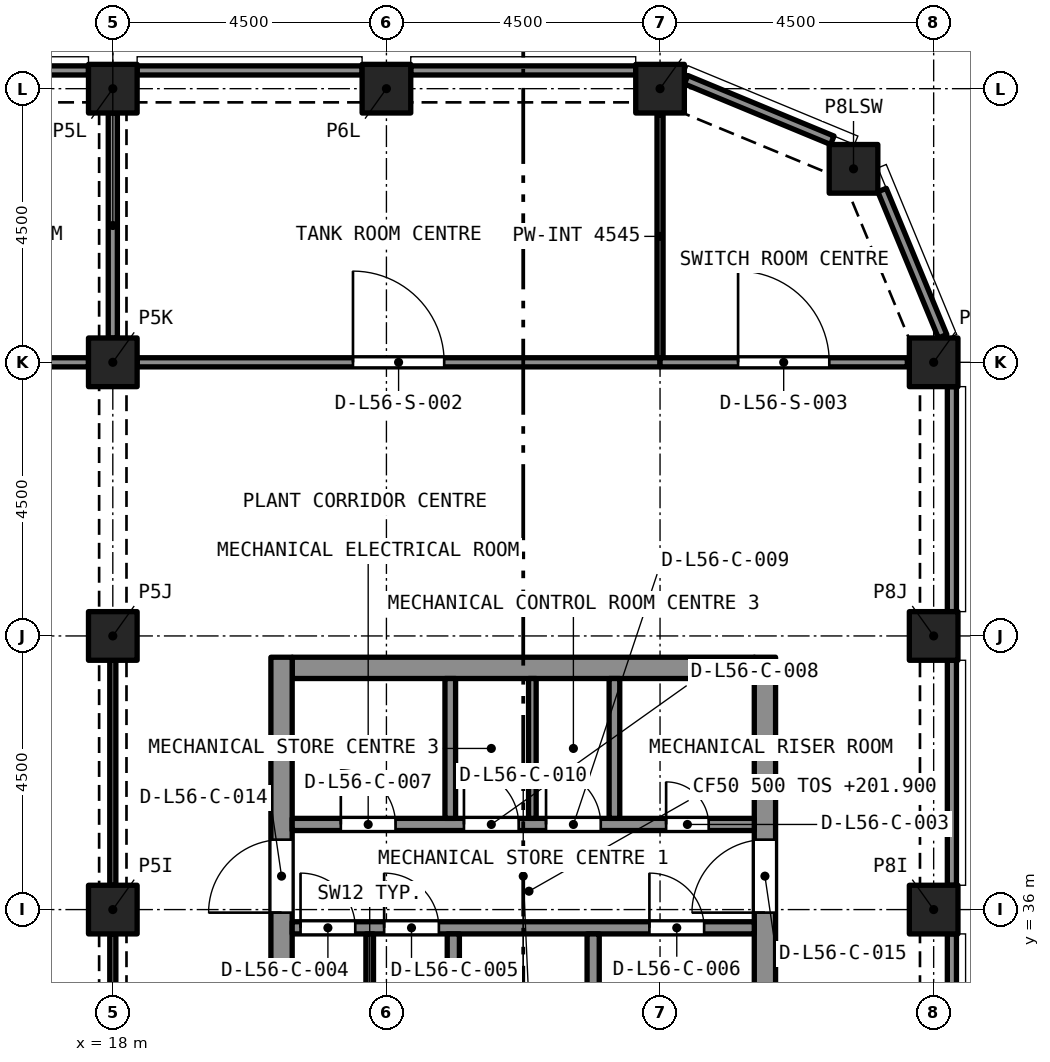
"""IFC4 building model, lengths in metres.
Left out: names, types, materials, properties, quantities, classifications, styles, units other than length and angle.
Written with IfcOpenShell. Run it as: python <this file> out.ifc"""

import sys

from ifc_helpers import new_model, si_unit, direction, frame, frame_2d, origin, origin_2d, place, context, subcontext, project, spatial, rectangle, extrude, element, fill, save


model = new_model("IFC4")
c1 = context("Model", 3, precision=1e-05, world=origin(), true_north=direction((0.0, 1.0)))
c2 = subcontext(c1, "Body", "Model", "MODEL_VIEW")
j1 = project(units=[si_unit("LENGTHUNIT", "METRE"), si_unit("PLANEANGLEUNIT", "RADIAN")], contexts=[c1])
p1 = place(None, origin())
s1 = spatial("IfcSite", under=j1, at=p1, CompositionType="ELEMENT")
p2 = place(p1, origin())
s2 = spatial("IfcBuilding", under=s1, at=p2, CompositionType="ELEMENT")
p3 = place(p2, frame((0.0, 0.0, 201.9)))
s3 = spatial("IfcBuildingStorey", under=s2, at=p3, CompositionType="ELEMENT", Elevation=201.9)
for number, where, z_axis, x_axis in (
    (1, (18.0, 36.0, 0.0), (0.0, 0.0, 1.0), (1.0, 0.0, 0.0)),
    (2, (31.5, 36.0, 0.0), (0.0, 0.0, 1.0), (1.0, 0.0, 0.0)),
    (3, (18.0, 40.5, 0.0), (0.0, 0.0, 1.0), (1.0, 0.0, 0.0)),
    (4, (31.5, 40.5, 0.0), (0.0, 0.0, 1.0), (1.0, 0.0, 0.0)),
    (5, (18.0, 45.0, 0.0), (0.0, 0.0, 1.0), (1.0, 0.0, 0.0)),
    (6, (31.5, 45.0, 0.0), (0.0, 0.0, 1.0), (1.0, 0.0, 0.0)),
    (7, (30.182, 48.182, 0.0), (0.0, 0.0, 1.0), (1.0, 0.0, 0.0)),
    (8, (18.0, 49.5, 0.0), (0.0, 0.0, 1.0), (1.0, 0.0, 0.0)),
    (9, (22.5, 49.5, 0.0), (0.0, 0.0, 1.0), (1.0, 0.0, 0.0)),
    (10, (27.0, 49.5, 0.0), (0.0, 0.0, 1.0), (1.0, 0.0, 0.0)),
):
    element("IfcColumn", number, at=place(p3, frame(where, z_axis=z_axis, x_axis=x_axis)), inside=s3, PredefinedType="COLUMN", context=c2, shape_type="SweptSolid", body=[
        extrude(rectangle(XDim=0.8, YDim=0.8, at=origin_2d()), origin(), (0.0, 0.0, 1.0), 4.995),
    ])
p4 = place(p3, frame((20.95, 39.975, 0.0), z_axis=(0.0, 0.0, 1.0), x_axis=(1.0, 0.0, 0.0)))
e11 = element("IfcWall", 11, at=p4, inside=s3, PredefinedType="SOLIDWALL", context=c2, shape_type="SweptSolid", body=[
    extrude(rectangle(XDim=7.6, YDim=0.35, at=frame_2d((3.8, 0.0))), origin(), (0.0, 0.0, 1.0), 4.995),
])
p5 = place(p3, frame((20.775, 27.35, 0.0), z_axis=(0.0, 0.0, 1.0), x_axis=(0.0, 1.0, 0.0)))
e12 = element("IfcWall", 12, at=p5, inside=s3, PredefinedType="SOLIDWALL", context=c2, shape_type="SweptSolid", body=[
    extrude(rectangle(XDim=12.8, YDim=0.35, at=frame_2d((6.4, 0.0))), origin(), (0.0, 0.0, 1.0), 4.995),
])
p6 = place(p5, frame((8.6, 0.0, 0.0)))
e13 = element("IfcOpeningElement", 13, at=p6, cuts=e12, PredefinedType="OPENING", context=c2, shape_type="SweptSolid", body=[
    extrude(rectangle(XDim=1.2, YDim=2.1, at=frame_2d((0.6, 1.05))), frame((0.0, 0.185, 0.0), z_axis=(0.0, -1.0, 0.0), x_axis=(1.0, 0.0, 0.0)), (0.0, 0.0, 1.0), 0.37),
])
p7 = place(p3, frame((28.725, 27.35, 0.0), z_axis=(0.0, 0.0, 1.0), x_axis=(0.0, 1.0, 0.0)))
e14 = element("IfcWall", 14, at=p7, inside=s3, PredefinedType="SOLIDWALL", context=c2, shape_type="SweptSolid", body=[
    extrude(rectangle(XDim=12.8, YDim=0.35, at=frame_2d((6.4, 0.0))), origin(), (0.0, 0.0, 1.0), 4.995),
])
p8 = place(p7, frame((8.6, 0.0, 0.0)))
e15 = element("IfcOpeningElement", 15, at=p8, cuts=e14, PredefinedType="OPENING", context=c2, shape_type="SweptSolid", body=[
    extrude(rectangle(XDim=1.2, YDim=2.1, at=frame_2d((0.6, 1.05))), frame((0.0, 0.185, 0.0), z_axis=(0.0, -1.0, 0.0), x_axis=(1.0, 0.0, 0.0)), (0.0, 0.0, 1.0), 0.37),
])
for number, where, z_axis, x_axis in (
    (16, (31.8, 35.6, 0.0), (0.0, 0.0, 1.0), (0.0, -1.0, 0.0)),
    (17, (31.8, 40.1, 0.0), (0.0, 0.0, 1.0), (0.0, -1.0, 0.0)),
    (18, (31.8, 44.6, 0.0), (0.0, 0.0, 1.0), (0.0, -1.0, 0.0)),
):
    element("IfcWall", number, at=place(p3, frame(where, z_axis=z_axis, x_axis=x_axis)), inside=s3, PredefinedType="SOLIDWALL", context=c2, shape_type="SweptSolid", body=[
        extrude(rectangle(XDim=3.7, YDim=0.15, at=frame_2d((1.85, 0.0))), origin(), (0.0, 0.0, 1.0), 4.995),
    ])
for number, where, z_axis, x_axis in (
    (19, (30.651, 47.833, 0.0), (0.0, 0.0, 1.0), (0.383, -0.924, 0.0)),
    (20, (27.429, 49.647, 0.0), (0.0, 0.0, 1.0), (0.924, -0.383, 0.0)),
):
    element("IfcWall", number, at=place(p3, frame(where, z_axis=z_axis, x_axis=x_axis)), inside=s3, PredefinedType="SOLIDWALL", context=c2, shape_type="SweptSolid", body=[
        extrude(rectangle(XDim=2.602, YDim=0.15, at=frame_2d((1.301, 0.0))), origin(), (0.0, 0.0, 1.0), 4.995),
    ])
for number, where, z_axis, x_axis in (
    (21, (22.9, 49.8, 0.0), (0.0, 0.0, 1.0), (1.0, 0.0, 0.0)),
    (22, (18.4, 49.8, 0.0), (0.0, 0.0, 1.0), (1.0, 0.0, 0.0)),
    (23, (13.9, 49.8, 0.0), (0.0, 0.0, 1.0), (1.0, 0.0, 0.0)),
):
    element("IfcWall", number, at=place(p3, frame(where, z_axis=z_axis, x_axis=x_axis)), inside=s3, PredefinedType="SOLIDWALL", context=c2, shape_type="SweptSolid", body=[
        extrude(rectangle(XDim=3.7, YDim=0.15, at=frame_2d((1.85, 0.0))), origin(), (0.0, 0.0, 1.0), 4.995),
    ])
p9 = place(p3, frame((20.95, 35.7, 0.0), z_axis=(0.0, 0.0, 1.0), x_axis=(1.0, 0.0, 0.0)))
e24 = element("IfcWall", 24, at=p9, inside=s3, PredefinedType="SOLIDWALL", context=c2, shape_type="SweptSolid", body=[
    extrude(rectangle(XDim=7.6, YDim=0.2, at=frame_2d((3.8, 0.0))), origin(), (0.0, 0.0, 1.0), 4.695),
])
p10 = place(p9, frame((0.137, 0.0, 0.0)))
e25 = element("IfcOpeningElement", 25, at=p10, cuts=e24, PredefinedType="OPENING", context=c2, shape_type="SweptSolid", body=[
    extrude(rectangle(XDim=0.9, YDim=2.1, at=frame_2d((0.45, 1.05))), frame((0.0, 0.11, 0.0), z_axis=(0.0, -1.0, 0.0), x_axis=(1.0, 0.0, 0.0)), (0.0, 0.0, 1.0), 0.22),
])
p11 = place(p9, frame((1.512, 0.0, 0.0)))
e26 = element("IfcOpeningElement", 26, at=p11, cuts=e24, PredefinedType="OPENING", context=c2, shape_type="SweptSolid", body=[
    extrude(rectangle(XDim=0.9, YDim=2.1, at=frame_2d((0.45, 1.05))), frame((0.0, 0.11, 0.0), z_axis=(0.0, -1.0, 0.0), x_axis=(1.0, 0.0, 0.0)), (0.0, 0.0, 1.0), 0.22),
])
p12 = place(p9, frame((5.875, 0.0, 0.0)))
e27 = element("IfcOpeningElement", 27, at=p12, cuts=e24, PredefinedType="OPENING", context=c2, shape_type="SweptSolid", body=[
    extrude(rectangle(XDim=0.9, YDim=2.1, at=frame_2d((0.45, 1.05))), frame((0.0, 0.11, 0.0), z_axis=(0.0, -1.0, 0.0), x_axis=(1.0, 0.0, 0.0)), (0.0, 0.0, 1.0), 0.22),
])
p13 = place(p3, frame((20.95, 37.4, 0.0), z_axis=(0.0, 0.0, 1.0), x_axis=(1.0, 0.0, 0.0)))
e28 = element("IfcWall", 28, at=p13, inside=s3, PredefinedType="SOLIDWALL", context=c2, shape_type="SweptSolid", body=[
    extrude(rectangle(XDim=7.6, YDim=0.2, at=frame_2d((3.8, 0.0))), origin(), (0.0, 0.0, 1.0), 4.695),
])
p14 = place(p13, frame((6.15, 0.0, 0.0)))
e29 = element("IfcOpeningElement", 29, at=p14, cuts=e28, PredefinedType="OPENING", context=c2, shape_type="SweptSolid", body=[
    extrude(rectangle(XDim=0.7, YDim=2.1, at=frame_2d((0.35, 1.05))), frame((0.0, 0.11, 0.0), z_axis=(0.0, -1.0, 0.0), x_axis=(1.0, 0.0, 0.0)), (0.0, 0.0, 1.0), 0.22),
])
p15 = place(p13, frame((0.8, 0.0, 0.0)))
e30 = element("IfcOpeningElement", 30, at=p15, cuts=e28, PredefinedType="OPENING", context=c2, shape_type="SweptSolid", body=[
    extrude(rectangle(XDim=0.9, YDim=2.1, at=frame_2d((0.45, 1.05))), frame((0.0, 0.11, 0.0), z_axis=(0.0, -1.0, 0.0), x_axis=(1.0, 0.0, 0.0)), (0.0, 0.0, 1.0), 0.22),
])
p16 = place(p13, frame((2.825, 0.0, 0.0)))
e31 = element("IfcOpeningElement", 31, at=p16, cuts=e28, PredefinedType="OPENING", context=c2, shape_type="SweptSolid", body=[
    extrude(rectangle(XDim=0.9, YDim=2.1, at=frame_2d((0.45, 1.05))), frame((0.0, 0.11, 0.0), z_axis=(0.0, -1.0, 0.0), x_axis=(1.0, 0.0, 0.0)), (0.0, 0.0, 1.0), 0.22),
])
p17 = place(p13, frame((4.175, 0.0, 0.0)))
e32 = element("IfcOpeningElement", 32, at=p17, cuts=e28, PredefinedType="OPENING", context=c2, shape_type="SweptSolid", body=[
    extrude(rectangle(XDim=0.9, YDim=2.1, at=frame_2d((0.45, 1.05))), frame((0.0, 0.11, 0.0), z_axis=(0.0, -1.0, 0.0), x_axis=(1.0, 0.0, 0.0)), (0.0, 0.0, 1.0), 0.22),
])
for number, where, z_axis, x_axis in (
    (33, (23.6, 33.3, 0.0), (0.0, 0.0, 1.0), (0.0, 1.0, 0.0)),
    (34, (25.9, 33.3, 0.0), (0.0, 0.0, 1.0), (0.0, 1.0, 0.0)),
):
    element("IfcWall", number, at=place(p3, frame(where, z_axis=z_axis, x_axis=x_axis)), inside=s3, PredefinedType="SOLIDWALL", context=c2, shape_type="SweptSolid", body=[
        extrude(rectangle(XDim=2.3, YDim=0.2, at=frame_2d((1.15, 0.0))), origin(), (0.0, 0.0, 1.0), 4.695),
    ])
for number, where, z_axis, x_axis in (
    (35, (23.55, 37.5, 0.0), (0.0, 0.0, 1.0), (0.0, 1.0, 0.0)),
    (36, (26.25, 37.5, 0.0), (0.0, 0.0, 1.0), (0.0, 1.0, 0.0)),
):
    element("IfcWall", number, at=place(p3, frame(where, z_axis=z_axis, x_axis=x_axis)), inside=s3, PredefinedType="SOLIDWALL", context=c2, shape_type="SweptSolid", body=[
        extrude(rectangle(XDim=2.3, YDim=0.175, at=frame_2d((1.15, 0.0))), origin(), (0.0, 0.0, 1.0), 4.695),
    ])
for number, where, z_axis, x_axis in (
    (37, (22.225, 33.3, 0.0), (0.0, 0.0, 1.0), (0.0, 1.0, 0.0)),
    (38, (24.9, 37.5, 0.0), (0.0, 0.0, 1.0), (0.0, 1.0, 0.0)),
):
    element("IfcWall", number, at=place(p3, frame(where, z_axis=z_axis, x_axis=x_axis)), inside=s3, PredefinedType="PARTITIONING", context=c2, shape_type="SweptSolid", body=[
        extrude(rectangle(XDim=2.3, YDim=0.125, at=frame_2d((1.15, 0.0))), origin(), (0.0, 0.0, 1.0), 4.695),
    ])
for number, where, z_axis, x_axis in (
    (39, (18.0, 31.9, 0.0), (0.0, 0.0, 1.0), (0.0, 1.0, 0.0)),
    (40, (18.0, 36.4, 0.0), (0.0, 0.0, 1.0), (0.0, 1.0, 0.0)),
):
    element("IfcWall", number, at=place(p3, frame(where, z_axis=z_axis, x_axis=x_axis)), inside=s3, PredefinedType="PARTITIONING", context=c2, shape_type="SweptSolid", body=[
        extrude(rectangle(XDim=3.7, YDim=0.1, at=frame_2d((1.85, 0.0))), origin(), (0.0, 0.0, 1.0), 4.175),
    ])
p18 = place(p3, frame((27.0, 45.075, 0.0), z_axis=(0.0, 0.0, 1.0), x_axis=(0.0, 1.0, 0.0)))
e41 = element("IfcWall", 41, at=p18, inside=s3, PredefinedType="PARTITIONING", context=c2, shape_type="SweptSolid", body=[
    extrude(rectangle(XDim=3.992, YDim=0.1, at=frame_2d((1.996, 0.0))), origin(), (0.0, 0.0, 1.0), 4.545),
])
p19 = place(p3, frame((18.4, 45.0, 0.0), z_axis=(0.0, 0.0, 1.0), x_axis=(1.0, 0.0, 0.0)))
e42 = element("IfcWall", 42, at=p19, inside=s3, PredefinedType="PARTITIONING", context=c2, shape_type="SweptSolid", body=[
    extrude(rectangle(XDim=8.6, YDim=0.15, at=frame_2d((4.3, 0.0))), origin(), (0.0, 0.0, 1.0), 4.545),
])
p20 = place(p19, frame((3.55, 0.0, 0.0)))
e43 = element("IfcOpeningElement", 43, at=p20, cuts=e42, PredefinedType="OPENING", context=c2, shape_type="SweptSolid", body=[
    extrude(rectangle(XDim=1.5, YDim=2.4, at=frame_2d((0.75, 1.2))), frame((0.0, 0.085, 0.0), z_axis=(0.0, -1.0, 0.0), x_axis=(1.0, 0.0, 0.0)), (0.0, 0.0, 1.0), 0.17),
])
p21 = place(p3, frame((18.0, 45.4, 0.0), z_axis=(0.0, 0.0, 1.0), x_axis=(0.0, 1.0, 0.0)))
e44 = element("IfcWall", 44, at=p21, inside=s3, PredefinedType="PARTITIONING", context=c2, shape_type="SweptSolid", body=[
    extrude(rectangle(XDim=3.7, YDim=0.15, at=frame_2d((1.85, 0.0))), origin(), (0.0, 0.0, 1.0), 4.175),
])
p22 = place(p3, frame((27.0, 45.0, 0.0), z_axis=(0.0, 0.0, 1.0), x_axis=(1.0, 0.0, 0.0)))
e45 = element("IfcWall", 45, at=p22, inside=s3, PredefinedType="PARTITIONING", context=c2, shape_type="SweptSolid", body=[
    extrude(rectangle(XDim=4.067, YDim=0.15, at=frame_2d((2.034, 0.0))), origin(), (0.0, 0.0, 1.0), 4.545),
])
p23 = place(p22, frame((1.283, 0.0, 0.0)))
e46 = element("IfcOpeningElement", 46, at=p23, cuts=e45, PredefinedType="OPENING", context=c2, shape_type="SweptSolid", body=[
    extrude(rectangle(XDim=1.5, YDim=2.4, at=frame_2d((0.75, 1.2))), frame((0.0, 0.085, 0.0), z_axis=(0.0, -1.0, 0.0), x_axis=(1.0, 0.0, 0.0)), (0.0, 0.0, 1.0), 0.17),
])
p24 = place(p3, frame((13.5, 45.0, 0.0), z_axis=(0.0, 0.0, 1.0), x_axis=(1.0, 0.0, 0.0)))
e47 = element("IfcWall", 47, at=p24, inside=s3, PredefinedType="PARTITIONING", context=c2, shape_type="SweptSolid", body=[
    extrude(rectangle(XDim=4.1, YDim=0.15, at=frame_2d((2.05, 0.0))), origin(), (0.0, 0.0, 1.0), 4.695),
])
p25 = place(p24, frame((1.55, 0.0, 0.0)))
e48 = element("IfcOpeningElement", 48, at=p25, cuts=e47, PredefinedType="OPENING", context=c2, shape_type="SweptSolid", body=[
    extrude(rectangle(XDim=1.0, YDim=2.1, at=frame_2d((0.5, 1.05))), frame((0.0, 0.085, 0.0), z_axis=(0.0, -1.0, 0.0), x_axis=(1.0, 0.0, 0.0)), (0.0, 0.0, 1.0), 0.17),
])
p26 = place(p14, origin())
e49 = element("IfcDoor", 49, at=p26, inside=s3, OperationType="SINGLE_SWING_LEFT", PredefinedType="DOOR", context=c2, shape_type="SweptSolid", body=[
    extrude(rectangle(XDim=0.7, YDim=2.1, at=frame_2d((0.35, 1.05))), frame((0.0, 0.025, 0.0), z_axis=(0.0, -1.0, 0.0), x_axis=(1.0, 0.0, 0.0)), (0.0, 0.0, 1.0), 0.05),
])
fill(e29, e49)
p27 = place(p10, origin())
e50 = element("IfcDoor", 50, at=p27, inside=s3, OperationType="SINGLE_SWING_LEFT", PredefinedType="DOOR", context=c2, shape_type="SweptSolid", body=[
    extrude(rectangle(XDim=0.9, YDim=2.1, at=frame_2d((0.45, 1.05))), frame((0.0, 0.025, 0.0), z_axis=(0.0, -1.0, 0.0), x_axis=(1.0, 0.0, 0.0)), (0.0, 0.0, 1.0), 0.05),
])
fill(e25, e50)
p28 = place(p11, origin())
e51 = element("IfcDoor", 51, at=p28, inside=s3, OperationType="SINGLE_SWING_LEFT", PredefinedType="DOOR", context=c2, shape_type="SweptSolid", body=[
    extrude(rectangle(XDim=0.9, YDim=2.1, at=frame_2d((0.45, 1.05))), frame((0.0, 0.025, 0.0), z_axis=(0.0, -1.0, 0.0), x_axis=(1.0, 0.0, 0.0)), (0.0, 0.0, 1.0), 0.05),
])
fill(e26, e51)
p29 = place(p12, origin())
e52 = element("IfcDoor", 52, at=p29, inside=s3, OperationType="SINGLE_SWING_LEFT", PredefinedType="DOOR", context=c2, shape_type="SweptSolid", body=[
    extrude(rectangle(XDim=0.9, YDim=2.1, at=frame_2d((0.45, 1.05))), frame((0.0, 0.025, 0.0), z_axis=(0.0, -1.0, 0.0), x_axis=(1.0, 0.0, 0.0)), (0.0, 0.0, 1.0), 0.05),
])
fill(e27, e52)
p30 = place(p15, origin())
e53 = element("IfcDoor", 53, at=p30, inside=s3, OperationType="SINGLE_SWING_LEFT", PredefinedType="DOOR", context=c2, shape_type="SweptSolid", body=[
    extrude(rectangle(XDim=0.9, YDim=2.1, at=frame_2d((0.45, 1.05))), frame((0.0, 0.025, 0.0), z_axis=(0.0, -1.0, 0.0), x_axis=(1.0, 0.0, 0.0)), (0.0, 0.0, 1.0), 0.05),
])
fill(e30, e53)
p31 = place(p16, origin())
e54 = element("IfcDoor", 54, at=p31, inside=s3, OperationType="SINGLE_SWING_LEFT", PredefinedType="DOOR", context=c2, shape_type="SweptSolid", body=[
    extrude(rectangle(XDim=0.9, YDim=2.1, at=frame_2d((0.45, 1.05))), frame((0.0, 0.025, 0.0), z_axis=(0.0, -1.0, 0.0), x_axis=(1.0, 0.0, 0.0)), (0.0, 0.0, 1.0), 0.05),
])
fill(e31, e54)
p32 = place(p17, origin())
e55 = element("IfcDoor", 55, at=p32, inside=s3, OperationType="SINGLE_SWING_LEFT", PredefinedType="DOOR", context=c2, shape_type="SweptSolid", body=[
    extrude(rectangle(XDim=0.9, YDim=2.1, at=frame_2d((0.45, 1.05))), frame((0.0, 0.025, 0.0), z_axis=(0.0, -1.0, 0.0), x_axis=(1.0, 0.0, 0.0)), (0.0, 0.0, 1.0), 0.05),
])
fill(e32, e55)
p33 = place(p6, origin())
e56 = element("IfcDoor", 56, at=p33, inside=s3, OperationType="SINGLE_SWING_LEFT", PredefinedType="DOOR", context=c2, shape_type="SweptSolid", body=[
    extrude(rectangle(XDim=1.2, YDim=2.1, at=frame_2d((0.6, 1.05))), frame((0.0, 0.025, 0.0), z_axis=(0.0, -1.0, 0.0), x_axis=(1.0, 0.0, 0.0)), (0.0, 0.0, 1.0), 0.05),
])
fill(e13, e56)
p34 = place(p8, origin())
e57 = element("IfcDoor", 57, at=p34, inside=s3, OperationType="SINGLE_SWING_LEFT", PredefinedType="DOOR", context=c2, shape_type="SweptSolid", body=[
    extrude(rectangle(XDim=1.2, YDim=2.1, at=frame_2d((0.6, 1.05))), frame((0.0, 0.025, 0.0), z_axis=(0.0, -1.0, 0.0), x_axis=(1.0, 0.0, 0.0)), (0.0, 0.0, 1.0), 0.05),
])
fill(e15, e57)
p35 = place(p20, origin())
e58 = element("IfcDoor", 58, at=p35, inside=s3, OperationType="DOUBLE_DOOR_SINGLE_SWING", PredefinedType="DOOR", context=c2, shape_type="SweptSolid", body=[
    extrude(rectangle(XDim=1.5, YDim=2.4, at=frame_2d((0.75, 1.2))), frame((0.0, 0.025, 0.0), z_axis=(0.0, -1.0, 0.0), x_axis=(1.0, 0.0, 0.0)), (0.0, 0.0, 1.0), 0.05),
])
fill(e43, e58)
p36 = place(p23, origin())
e59 = element("IfcDoor", 59, at=p36, inside=s3, OperationType="DOUBLE_DOOR_SINGLE_SWING", PredefinedType="DOOR", context=c2, shape_type="SweptSolid", body=[
    extrude(rectangle(XDim=1.5, YDim=2.4, at=frame_2d((0.75, 1.2))), frame((0.0, 0.025, 0.0), z_axis=(0.0, -1.0, 0.0), x_axis=(1.0, 0.0, 0.0)), (0.0, 0.0, 1.0), 0.05),
])
fill(e46, e59)
save(model, sys.argv[1])
